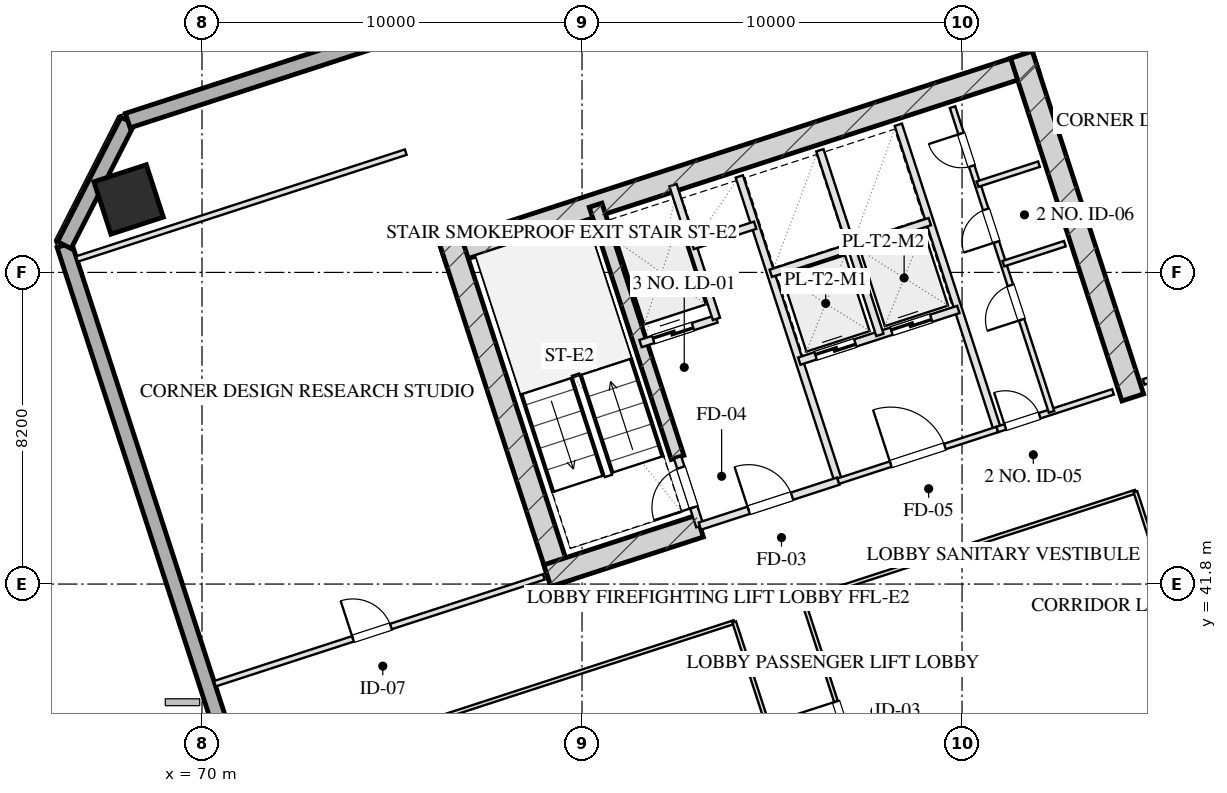
"""IFC4 building model, lengths in metres.
Left out: names, types, materials, properties, quantities, classifications, styles, units other than length and angle.
Written with IfcOpenShell. Run it as: python <this file> out.ifc"""

import sys

from ifc_helpers import new_model, si_unit, direction, frame, frame_2d, origin, origin_2d, place, context, subcontext, project, spatial, rectangle, hollow_rectangle, extrude, element, fill, save


model = new_model("IFC4")
c1 = context("Model", 3, precision=1e-05, world=origin(), true_north=direction((0.0, 1.0)))
c2 = subcontext(c1, "Body", "Model", "MODEL_VIEW")
j1 = project(units=[si_unit("LENGTHUNIT", "METRE"), si_unit("PLANEANGLEUNIT", "RADIAN")], contexts=[c1])
p1 = place(None, origin())
s1 = spatial("IfcSite", under=j1, at=p1, CompositionType="ELEMENT")
p2 = place(p1, origin())
s2 = spatial("IfcBuilding", under=s1, at=p2, CompositionType="ELEMENT")
p3 = place(p2, frame((0.0, 0.0, 131.1)))
s3 = spatial("IfcBuildingStorey", under=s2, at=p3, CompositionType="ELEMENT", Elevation=131.1)
p4 = place(p3, frame((76.344, 50.466, 0.0), z_axis=(0.0, 0.0, 1.0), x_axis=(0.951055727519, 0.309019421968, 0.0)))
e1 = element("IfcWall", 1, at=p4, inside=s3, PredefinedType="SHEAR", context=c2, shape_type="SweptSolid", body=[
    extrude(rectangle(XDim=16.4, YDim=0.6, at=frame_2d((8.2, 0.0))), origin(), (0.0, 0.0, 1.0), 3.45),
])
for number, where, z_axis, x_axis in (
    (2, (79.466, 41.828, 0.0), (0.0, 0.0, 1.0), (-0.309, 0.951, 0.0)),
    (3, (94.492, 46.71, 0.0), (0.0, 0.0, 1.0), (-0.309, 0.951, 0.0)),
):
    element("IfcWall", number, at=place(p3, frame(where, z_axis=z_axis, x_axis=x_axis)), inside=s3, PredefinedType="SHEAR", context=c2, shape_type="SweptSolid", body=[
        extrude(rectangle(XDim=9.48, YDim=0.6, at=frame_2d((4.74, 0.0))), origin(), (0.0, 0.0, 1.0), 3.45),
    ])
p5 = place(p3, frame((82.514, 45.131, 0.0), z_axis=(0.0, 0.0, 1.0), x_axis=(-0.308988790936, 0.951065679686, 0.0)))
e4 = element("IfcWall", 4, at=p5, inside=s3, PredefinedType="SHEAR", context=c2, shape_type="SweptSolid", body=[
    extrude(rectangle(XDim=6.98, YDim=0.35, at=frame_2d((3.49, 0.0))), origin(), (0.0, 0.0, 1.0), 3.45),
])
p6 = place(p3, frame((79.087, 42.021, 0.0), z_axis=(0.0, 0.0, 1.0), x_axis=(0.951062550203, 0.3089984233, 0.0)))
e5 = element("IfcWall", 5, at=p6, inside=s3, PredefinedType="SHEAR", context=c2, shape_type="SweptSolid", body=[
    extrude(rectangle(XDim=4.22, YDim=0.6, at=frame_2d((2.11, 0.0))), origin(), (0.0, 0.0, 1.0), 3.45),
])
p7 = place(p3, frame((68.069, 51.92, 0.0), z_axis=(0.0, 0.0, 1.0), x_axis=(0.951056516295, 0.309016994375, 0.0)))
e6 = element("IfcColumn", 6, at=p7, inside=s3, PredefinedType="COLUMN", context=c2, shape_type="SweptSolid", body=[
    extrude(hollow_rectangle(XDim=1.45, YDim=1.45, WallThickness=0.05, at=origin_2d()), origin(), (0.0, 0.0, 1.0), 3.451),
])
p8 = place(p3, frame((80.716, 6.59, 0.0), z_axis=(0.0, 0.0, 1.0), x_axis=(-0.309017542002, 0.95105633836, 0.0)))
e7 = element("IfcWall", 7, at=p8, inside=s3, PredefinedType="SOLIDWALL", context=c2, shape_type="SweptSolid", body=[
    extrude(rectangle(XDim=46.4, YDim=0.4, at=frame_2d((23.2, 0.0))), origin(), (0.0, 0.0, 1.0), 2.61),
])
p9 = place(p8, frame((24.675, 0.0, 0.75)))
e8 = element("IfcOpeningElement", 8, at=p9, cuts=e7, PredefinedType="OPENING", context=c2, shape_type="SweptSolid", body=[
    extrude(rectangle(XDim=2.25, YDim=1.46, at=frame_2d((1.125, 0.73))), frame((0.0, 0.21, 0.0), z_axis=(0.0, -1.0, 0.0), x_axis=(1.0, 0.0, 0.0)), (0.0, 0.0, 1.0), 0.42),
])
p10 = place(p8, frame((28.475, 0.0, 0.75)))
e9 = element("IfcOpeningElement", 9, at=p10, cuts=e7, PredefinedType="OPENING", context=c2, shape_type="SweptSolid", body=[
    extrude(rectangle(XDim=2.25, YDim=1.46, at=frame_2d((1.125, 0.73))), frame((0.0, 0.21, 0.0), z_axis=(0.0, -1.0, 0.0), x_axis=(1.0, 0.0, 0.0)), (0.0, 0.0, 1.0), 0.42),
])
p11 = place(p8, frame((18.25, 0.0, 0.0)))
e10 = element("IfcOpeningElement", 10, at=p11, cuts=e7, PredefinedType="OPENING", context=c2, shape_type="SweptSolid", body=[
    extrude(rectangle(XDim=1.1, YDim=2.15, at=frame_2d((0.55, 1.075))), frame((0.0, 0.21, 0.0), z_axis=(0.0, -1.0, 0.0), x_axis=(1.0, 0.0, 0.0)), (0.0, 0.0, 1.0), 0.42),
])
p12 = place(p3, frame((66.377, 50.719, 0.0), z_axis=(0.0, 0.0, 1.0), x_axis=(0.454026238093, 0.890988313685, 0.0)))
e11 = element("IfcWall", 11, at=p12, inside=s3, PredefinedType="SOLIDWALL", context=c2, shape_type="SweptSolid", body=[
    extrude(rectangle(XDim=3.677, YDim=0.4, at=frame_2d((1.838, 0.0))), origin(), (0.0, 0.0, 1.0), 2.61),
])
p13 = place(p3, frame((68.047, 53.995, 0.0), z_axis=(0.0, 0.0, 1.0), x_axis=(0.95105505922, 0.309021478754, 0.0)))
e12 = element("IfcWall", 12, at=p13, inside=s3, PredefinedType="SOLIDWALL", context=c2, shape_type="SweptSolid", body=[
    extrude(rectangle(XDim=29.4, YDim=0.4, at=frame_2d((14.7, 0.0))), origin(), (0.0, 0.0, 1.0), 2.61),
])
p14 = place(p3, frame((83.101, 43.324, 0.0), z_axis=(0.0, 0.0, 1.0), x_axis=(-0.309048298632, 0.951046344356, 0.0)))
e13 = element("IfcWall", 13, at=p14, inside=s3, PredefinedType="PARTITIONING", context=c2, shape_type="SweptSolid", body=[
    extrude(rectangle(XDim=1.9, YDim=0.2, at=frame_2d((0.95, 0.0))), origin(), (0.0, 0.0, 1.0), 3.175),
])
p15 = place(p14, frame((0.52, 0.0, 0.0)))
e14 = element("IfcOpeningElement", 14, at=p15, cuts=e13, PredefinedType="OPENING", context=c2, shape_type="SweptSolid", body=[
    extrude(rectangle(XDim=1.1, YDim=2.05, at=frame_2d((0.55, 1.025))), frame((0.0, 0.11, 0.0), z_axis=(0.0, -1.0, 0.0), x_axis=(1.0, 0.0, 0.0)), (0.0, 0.0, 1.0), 0.22),
])
p16 = place(p3, frame((86.743, 44.508, 0.0), z_axis=(0.0, 0.0, 1.0), x_axis=(-0.309016001439, 0.951056838919, 0.0)))
e15 = element("IfcWall", 15, at=p16, inside=s3, PredefinedType="PARTITIONING", context=c2, shape_type="SweptSolid", body=[
    extrude(rectangle(XDim=8.43, YDim=0.2, at=frame_2d((4.215, 0.0))), origin(), (0.0, 0.0, 1.0), 3.175),
])
p17 = place(p3, frame((83.101, 43.324, 0.0), z_axis=(0.0, 0.0, 1.0), x_axis=(0.951052804469, 0.309028417967, 0.0)))
e16 = element("IfcWall", 16, at=p17, inside=s3, PredefinedType="PARTITIONING", context=c2, shape_type="SweptSolid", body=[
    extrude(rectangle(XDim=3.83, YDim=0.2, at=frame_2d((1.915, 0.0))), origin(), (0.0, 0.0, 1.0), 3.175),
])
p18 = place(p17, frame((1.35, 0.0, 0.0)))
e17 = element("IfcOpeningElement", 17, at=p18, cuts=e16, PredefinedType="OPENING", context=c2, shape_type="SweptSolid", body=[
    extrude(rectangle(XDim=1.2, YDim=2.05, at=frame_2d((0.6, 1.025))), frame((0.0, 0.11, 0.0), z_axis=(0.0, -1.0, 0.0), x_axis=(1.0, 0.0, 0.0)), (0.0, 0.0, 1.0), 0.22),
])
p19 = place(p3, frame((81.54, 48.127, 0.0), z_axis=(0.0, 0.0, 1.0), x_axis=(0.951062257173, 0.308999325213, 0.0)))
e18 = element("IfcWall", 18, at=p19, inside=s3, PredefinedType="PARTITIONING", context=c2, shape_type="SweptSolid", body=[
    extrude(rectangle(XDim=2.1, YDim=0.2, at=frame_2d((1.05, 0.0))), origin(), (0.0, 0.0, 1.0), 3.175),
])
p20 = place(p19, frame((0.35, 0.0, 0.0)))
e19 = element("IfcOpeningElement", 19, at=p20, cuts=e18, PredefinedType="OPENING", context=c2, shape_type="SweptSolid", body=[
    extrude(rectangle(XDim=1.1, YDim=2.05, at=frame_2d((0.55, 1.025))), frame((0.0, 0.11, 0.0), z_axis=(0.0, -1.0, 0.0), x_axis=(1.0, 0.0, 0.0)), (0.0, 0.0, 1.0), 0.22),
])
p21 = place(p3, frame((83.538, 48.776, 0.0), z_axis=(0.0, 0.0, 1.0), x_axis=(-0.3089935693, 0.951064127245, 0.0)))
e20 = element("IfcWall", 20, at=p21, inside=s3, PredefinedType="PARTITIONING", context=c2, shape_type="SweptSolid", body=[
    extrude(rectangle(XDim=3.7, YDim=0.2, at=frame_2d((1.85, 0.0))), origin(), (0.0, 0.0, 1.0), 3.175),
])
p22 = place(p3, frame((82.91, 50.707, 0.0), z_axis=(0.0, 0.0, 1.0), x_axis=(0.951041328149, 0.309063734775, 0.0)))
e21 = element("IfcWall", 21, at=p22, inside=s3, PredefinedType="PARTITIONING", context=c2, shape_type="SweptSolid", body=[
    extrude(rectangle(XDim=1.73, YDim=0.2, at=frame_2d((0.865, 0.0))), origin(), (0.0, 0.0, 1.0), 3.175),
])
p23 = place(p3, frame((90.928, 45.868, 0.0), z_axis=(0.0, 0.0, 1.0), x_axis=(-0.309042196757, 0.951048327176, 0.0)))
e22 = element("IfcWall", 22, at=p23, inside=s3, PredefinedType="PARTITIONING", context=c2, shape_type="SweptSolid", body=[
    extrude(rectangle(XDim=8.43, YDim=0.2, at=frame_2d((4.215, 0.0))), origin(), (0.0, 0.0, 1.0), 3.175),
])
p24 = place(p3, frame((86.743, 44.508, 0.0), z_axis=(0.0, 0.0, 1.0), x_axis=(0.951063829732, 0.308994485023, 0.0)))
e23 = element("IfcWall", 23, at=p24, inside=s3, PredefinedType="PARTITIONING", context=c2, shape_type="SweptSolid", body=[
    extrude(rectangle(XDim=4.4, YDim=0.15, at=frame_2d((2.2, 0.0))), origin(), (0.0, 0.0, 1.0), 3.175),
])
p25 = place(p24, frame((1.45, 0.0, 0.0)))
e24 = element("IfcOpeningElement", 24, at=p25, cuts=e23, PredefinedType="OPENING", context=c2, shape_type="SweptSolid", body=[
    extrude(rectangle(XDim=1.5, YDim=2.05, at=frame_2d((0.75, 1.025))), frame((0.0, 0.085, 0.0), z_axis=(0.0, -1.0, 0.0), x_axis=(1.0, 0.0, 0.0)), (0.0, 0.0, 1.0), 0.17),
])
p26 = place(p3, frame((85.718, 47.666, 0.0), z_axis=(0.0, 0.0, 1.0), x_axis=(0.951058531764, 0.30901079133, 0.0)))
e25 = element("IfcWall", 25, at=p26, inside=s3, PredefinedType="PARTITIONING", context=c2, shape_type="SweptSolid", body=[
    extrude(rectangle(XDim=4.4, YDim=0.2, at=frame_2d((2.2, 0.0))), origin(), (0.0, 0.0, 1.0), 3.175),
])
p27 = place(p26, frame((0.45, 0.0, 0.0)))
e26 = element("IfcOpeningElement", 26, at=p27, cuts=e25, PredefinedType="OPENING", context=c2, shape_type="SweptSolid", body=[
    extrude(rectangle(XDim=1.1, YDim=2.05, at=frame_2d((0.55, 1.025))), frame((0.0, 0.11, 0.0), z_axis=(0.0, -1.0, 0.0), x_axis=(1.0, 0.0, 0.0)), (0.0, 0.0, 1.0), 0.22),
])
p28 = place(p26, frame((2.55, 0.0, 0.0)))
e27 = element("IfcOpeningElement", 27, at=p28, cuts=e25, PredefinedType="OPENING", context=c2, shape_type="SweptSolid", body=[
    extrude(rectangle(XDim=1.1, YDim=2.05, at=frame_2d((0.55, 1.025))), frame((0.0, 0.11, 0.0), z_axis=(0.0, -1.0, 0.0), x_axis=(1.0, 0.0, 0.0)), (0.0, 0.0, 1.0), 0.22),
])
p29 = place(p3, frame((87.838, 48.354, 0.0), z_axis=(0.0, 0.0, 1.0), x_axis=(-0.3090093719, 0.951058992953, 0.0)))
e28 = element("IfcWall", 28, at=p29, inside=s3, PredefinedType="PARTITIONING", context=c2, shape_type="SweptSolid", body=[
    extrude(rectangle(XDim=5.11, YDim=0.2, at=frame_2d((2.555, 0.0))), origin(), (0.0, 0.0, 1.0), 3.175),
])
p30 = place(p3, frame((84.967, 49.977, 0.0), z_axis=(0.0, 0.0, 1.0), x_axis=(0.951063829732, 0.308994485023, 0.0)))
e29 = element("IfcWall", 29, at=p30, inside=s3, PredefinedType="PARTITIONING", context=c2, shape_type="SweptSolid", body=[
    extrude(rectangle(XDim=4.4, YDim=0.2, at=frame_2d((2.2, 0.0))), origin(), (0.0, 0.0, 1.0), 3.175),
])
p31 = place(p3, frame((90.928, 45.868, 0.0), z_axis=(0.0, 0.0, 1.0), x_axis=(0.951059297078, 0.309008435874, 0.0)))
e30 = element("IfcWall", 30, at=p31, inside=s3, PredefinedType="PARTITIONING", context=c2, shape_type="SweptSolid", body=[
    extrude(rectangle(XDim=3.2, YDim=0.15, at=frame_2d((1.6, 0.0))), origin(), (0.0, 0.0, 1.0), 3.175),
])
p32 = place(p31, frame((0.22, 0.0, 0.0)))
e31 = element("IfcOpeningElement", 31, at=p32, cuts=e30, PredefinedType="OPENING", context=c2, shape_type="SweptSolid", body=[
    extrude(rectangle(XDim=0.95, YDim=2.05, at=frame_2d((0.475, 1.025))), frame((0.0, 0.085, 0.0), z_axis=(0.0, -1.0, 0.0), x_axis=(1.0, 0.0, 0.0)), (0.0, 0.0, 1.0), 0.17),
])
p33 = place(p3, frame((92.355, 46.331, 0.0), z_axis=(0.0, 0.0, 1.0), x_axis=(-0.309007490203, 0.951059604335, 0.0)))
e32 = element("IfcWall", 32, at=p33, inside=s3, PredefinedType="PARTITIONING", context=c2, shape_type="SweptSolid", body=[
    extrude(rectangle(XDim=8.43, YDim=0.15, at=frame_2d((4.215, 0.0))), origin(), (0.0, 0.0, 1.0), 3.175),
])
p34 = place(p33, frame((2.55, 0.0, 0.0)))
e33 = element("IfcOpeningElement", 33, at=p34, cuts=e32, PredefinedType="OPENING", context=c2, shape_type="SweptSolid", body=[
    extrude(rectangle(XDim=0.95, YDim=2.05, at=frame_2d((0.475, 1.025))), frame((0.0, 0.085, 0.0), z_axis=(0.0, -1.0, 0.0), x_axis=(1.0, 0.0, 0.0)), (0.0, 0.0, 1.0), 0.17),
])
p35 = place(p33, frame((4.7, 0.0, 0.0)))
e34 = element("IfcOpeningElement", 34, at=p35, cuts=e32, PredefinedType="OPENING", context=c2, shape_type="SweptSolid", body=[
    extrude(rectangle(XDim=0.9, YDim=2.05, at=frame_2d((0.45, 1.025))), frame((0.0, 0.085, 0.0), z_axis=(0.0, -1.0, 0.0), x_axis=(1.0, 0.0, 0.0)), (0.0, 0.0, 1.0), 0.17),
])
p36 = place(p33, frame((6.8, 0.0, 0.0)))
e35 = element("IfcOpeningElement", 35, at=p36, cuts=e32, PredefinedType="OPENING", context=c2, shape_type="SweptSolid", body=[
    extrude(rectangle(XDim=0.9, YDim=2.05, at=frame_2d((0.45, 1.025))), frame((0.0, 0.085, 0.0), z_axis=(0.0, -1.0, 0.0), x_axis=(1.0, 0.0, 0.0)), (0.0, 0.0, 1.0), 0.17),
])
p37 = place(p3, frame((91.088, 50.23, 0.0), z_axis=(0.0, 0.0, 1.0), x_axis=(0.951054116971, 0.309024378638, 0.0)))
e36 = element("IfcWall", 36, at=p37, inside=s3, PredefinedType="PARTITIONING", context=c2, shape_type="SweptSolid", body=[
    extrude(rectangle(XDim=1.7, YDim=0.15, at=frame_2d((0.85, 0.0))), origin(), (0.0, 0.0, 1.0), 3.175),
])
p38 = place(p3, frame((90.408, 52.323, 0.0), z_axis=(0.0, 0.0, 1.0), x_axis=(0.951040401051, 0.309066587596, 0.0)))
e37 = element("IfcWall", 37, at=p38, inside=s3, PredefinedType="PARTITIONING", context=c2, shape_type="SweptSolid", body=[
    extrude(rectangle(XDim=1.7, YDim=0.15, at=frame_2d((0.85, 0.0))), origin(), (0.0, 0.0, 1.0), 3.175),
])
p39 = place(p3, frame((66.707, 50.352, 0.0), z_axis=(0.0, 0.0, 1.0), x_axis=(0.951057133767, 0.309015093986, 0.0)))
e38 = element("IfcWall", 38, at=p39, inside=s3, PredefinedType="PARTITIONING", context=c2, shape_type="SweptSolid", body=[
    extrude(rectangle(XDim=9.1, YDim=0.15, at=frame_2d((4.55, 0.0))), origin(), (0.0, 0.0, 1.0), 3.175),
])
p40 = place(p3, frame((70.338, 39.177, 0.0), z_axis=(0.0, 0.0, 1.0), x_axis=(0.951059695568, 0.309007209409, 0.0)))
e39 = element("IfcWall", 39, at=p40, inside=s3, PredefinedType="PARTITIONING", context=c2, shape_type="SweptSolid", body=[
    extrude(rectangle(XDim=9.1, YDim=0.15, at=frame_2d((4.55, 0.0))), origin(), (0.0, 0.0, 1.0), 2.15),
])
p41 = place(p40, frame((3.822, 0.0, 0.0)))
e40 = element("IfcOpeningElement", 40, at=p41, cuts=e39, PredefinedType="OPENING", context=c2, shape_type="SweptSolid", body=[
    extrude(rectangle(XDim=1.05, YDim=2.05, at=frame_2d((0.525, 1.025))), frame((0.0, 0.085, 0.0), z_axis=(0.0, -1.0, 0.0), x_axis=(1.0, 0.0, 0.0)), (0.0, 0.0, 1.0), 0.17),
])
p42 = place(p3, frame((94.78, 47.119, 0.0), z_axis=(0.0, 0.0, 1.0), x_axis=(0.951054329824, 0.309023723562, 0.0)))
e41 = element("IfcWall", 41, at=p42, inside=s3, PredefinedType="PARTITIONING", context=c2, shape_type="SweptSolid", body=[
    extrude(rectangle(XDim=8.5, YDim=0.15, at=frame_2d((4.25, 0.0))), origin(), (0.0, 0.0, 1.0), 2.15),
])
p43 = place(p42, frame((3.57, 0.0, 0.0)))
e42 = element("IfcOpeningElement", 42, at=p43, cuts=e41, PredefinedType="OPENING", context=c2, shape_type="SweptSolid", body=[
    extrude(rectangle(XDim=1.0, YDim=2.05, at=frame_2d((0.5, 1.025))), frame((0.0, 0.085, 0.0), z_axis=(0.0, -1.0, 0.0), x_axis=(1.0, 0.0, 0.0)), (0.0, 0.0, 1.0), 0.17),
])
p44 = place(p3, frame((71.166, 36.629, 0.0), z_axis=(0.0, 0.0, 1.0), x_axis=(0.951057589409, 0.309013691651, 0.0)))
e43 = element("IfcWall", 43, at=p44, inside=s3, PredefinedType="MOVABLE", context=c2, shape_type="SweptSolid", body=[
    extrude(rectangle(XDim=13.5, YDim=0.1, at=frame_2d((6.75, 0.0))), origin(), (0.0, 0.0, 1.0), 3.175),
])
p45 = place(p3, frame((85.812, 41.387, 0.0), z_axis=(0.0, 0.0, 1.0), x_axis=(0.951054933035, 0.309021867106, 0.0)))
e44 = element("IfcWall", 44, at=p45, inside=s3, PredefinedType="MOVABLE", context=c2, shape_type="SweptSolid", body=[
    extrude(rectangle(XDim=9.2, YDim=0.1, at=frame_2d((4.6, 0.0))), origin(), (0.0, 0.0, 1.0), 3.175),
])
p46 = place(p3, frame((89.147, 24.975, 0.0), z_axis=(0.0, 0.0, 1.0), x_axis=(-0.309022042254, 0.951054876125, 0.0)))
e45 = element("IfcWall", 45, at=p46, inside=s3, PredefinedType="MOVABLE", context=c2, shape_type="SweptSolid", body=[
    extrude(rectangle(XDim=16.64, YDim=0.1, at=frame_2d((8.32, 0.0))), origin(), (0.0, 0.0, 1.0), 3.175),
])
p47 = place(p46, frame((3.32, 0.0, 0.0)))
e46 = element("IfcOpeningElement", 46, at=p47, cuts=e45, PredefinedType="OPENING", context=c2, shape_type="SweptSolid", body=[
    extrude(rectangle(XDim=1.0, YDim=2.05, at=frame_2d((0.5, 1.025))), frame((0.0, 0.06, 0.0), z_axis=(0.0, -1.0, 0.0), x_axis=(1.0, 0.0, 0.0)), (0.0, 0.0, 1.0), 0.12),
])
p48 = place(p46, frame((11.64, 0.0, 0.0)))
e47 = element("IfcOpeningElement", 47, at=p48, cuts=e45, PredefinedType="OPENING", context=c2, shape_type="SweptSolid", body=[
    extrude(rectangle(XDim=1.0, YDim=2.05, at=frame_2d((0.5, 1.025))), frame((0.0, 0.06, 0.0), z_axis=(0.0, -1.0, 0.0), x_axis=(1.0, 0.0, 0.0)), (0.0, 0.0, 1.0), 0.12),
])
p49 = place(p3, frame((90.954, 25.562, 0.0), z_axis=(0.0, 0.0, 1.0), x_axis=(-0.30901773025, 0.951056277195, 0.0)))
e48 = element("IfcWall", 48, at=p49, inside=s3, PredefinedType="MOVABLE", context=c2, shape_type="SweptSolid", body=[
    extrude(rectangle(XDim=16.64, YDim=0.1, at=frame_2d((8.32, 0.0))), origin(), (0.0, 0.0, 1.0), 3.175),
])
p50 = place(p49, frame((4.284, 0.0, 0.0)))
e49 = element("IfcOpeningElement", 49, at=p50, cuts=e48, PredefinedType="OPENING", context=c2, shape_type="SweptSolid", body=[
    extrude(rectangle(XDim=1.1, YDim=2.05, at=frame_2d((0.55, 1.025))), frame((0.0, 0.06, 0.0), z_axis=(0.0, -1.0, 0.0), x_axis=(1.0, 0.0, 0.0)), (0.0, 0.0, 1.0), 0.12),
])
p51 = place(p49, frame((12.724, 0.0, 0.0)))
e50 = element("IfcOpeningElement", 50, at=p51, cuts=e48, PredefinedType="OPENING", context=c2, shape_type="SweptSolid", body=[
    extrude(rectangle(XDim=1.1, YDim=2.05, at=frame_2d((0.55, 1.025))), frame((0.0, 0.06, 0.0), z_axis=(0.0, -1.0, 0.0), x_axis=(1.0, 0.0, 0.0)), (0.0, 0.0, 1.0), 0.12),
])
p52 = place(p3, frame((99.704, 28.405, 0.0), z_axis=(0.0, 0.0, 1.0), x_axis=(-0.309004459387, 0.951060589068, 0.0)))
e51 = element("IfcWall", 51, at=p52, inside=s3, PredefinedType="MOVABLE", context=c2, shape_type="SweptSolid", body=[
    extrude(rectangle(XDim=16.64, YDim=0.1, at=frame_2d((8.32, 0.0))), origin(), (0.0, 0.0, 1.0), 3.175),
])
p53 = place(p15, origin())
e52 = element("IfcDoor", 52, at=p53, inside=s3, OperationType="SINGLE_SWING_LEFT", PredefinedType="DOOR", context=c2, shape_type="SweptSolid", body=[
    extrude(rectangle(XDim=1.1, YDim=2.05, at=frame_2d((0.55, 1.025))), frame((0.0, 0.025, 0.0), z_axis=(0.0, -1.0, 0.0), x_axis=(1.0, 0.0, 0.0)), (0.0, 0.0, 1.0), 0.05),
])
fill(e14, e52)
p54 = place(p18, origin())
e53 = element("IfcDoor", 53, at=p54, inside=s3, OperationType="SINGLE_SWING_LEFT", PredefinedType="DOOR", context=c2, shape_type="SweptSolid", body=[
    extrude(rectangle(XDim=1.2, YDim=2.05, at=frame_2d((0.6, 1.025))), frame((0.0, 0.025, 0.0), z_axis=(0.0, -1.0, 0.0), x_axis=(1.0, 0.0, 0.0)), (0.0, 0.0, 1.0), 0.05),
])
fill(e17, e53)
p55 = place(p20, origin())
e54 = element("IfcDoor", 54, at=p55, inside=s3, OperationType="DOUBLE_DOOR_SLIDING", PredefinedType="DOOR", context=c2, shape_type="SweptSolid", body=[
    extrude(rectangle(XDim=1.1, YDim=2.05, at=frame_2d((0.55, 1.025))), frame((0.0, 0.025, 0.0), z_axis=(0.0, -1.0, 0.0), x_axis=(1.0, 0.0, 0.0)), (0.0, 0.0, 1.0), 0.05),
])
fill(e19, e54)
p56 = place(p25, origin())
e55 = element("IfcDoor", 55, at=p56, inside=s3, OperationType="SINGLE_SWING_LEFT", PredefinedType="DOOR", context=c2, shape_type="SweptSolid", body=[
    extrude(rectangle(XDim=1.5, YDim=2.05, at=frame_2d((0.75, 1.025))), frame((0.0, 0.025, 0.0), z_axis=(0.0, -1.0, 0.0), x_axis=(1.0, 0.0, 0.0)), (0.0, 0.0, 1.0), 0.05),
])
fill(e24, e55)
p57 = place(p27, origin())
e56 = element("IfcDoor", 56, at=p57, inside=s3, OperationType="DOUBLE_DOOR_SLIDING", PredefinedType="DOOR", context=c2, shape_type="SweptSolid", body=[
    extrude(rectangle(XDim=1.1, YDim=2.05, at=frame_2d((0.55, 1.025))), frame((0.0, 0.025, 0.0), z_axis=(0.0, -1.0, 0.0), x_axis=(1.0, 0.0, 0.0)), (0.0, 0.0, 1.0), 0.05),
])
fill(e26, e56)
p58 = place(p28, origin())
e57 = element("IfcDoor", 57, at=p58, inside=s3, OperationType="DOUBLE_DOOR_SLIDING", PredefinedType="DOOR", context=c2, shape_type="SweptSolid", body=[
    extrude(rectangle(XDim=1.1, YDim=2.05, at=frame_2d((0.55, 1.025))), frame((0.0, 0.025, 0.0), z_axis=(0.0, -1.0, 0.0), x_axis=(1.0, 0.0, 0.0)), (0.0, 0.0, 1.0), 0.05),
])
fill(e27, e57)
p59 = place(p32, origin())
e58 = element("IfcDoor", 58, at=p59, inside=s3, OperationType="SINGLE_SWING_LEFT", PredefinedType="DOOR", context=c2, shape_type="SweptSolid", body=[
    extrude(rectangle(XDim=0.95, YDim=2.05, at=frame_2d((0.475, 1.025))), frame((0.0, 0.025, 0.0), z_axis=(0.0, -1.0, 0.0), x_axis=(1.0, 0.0, 0.0)), (0.0, 0.0, 1.0), 0.05),
])
fill(e31, e58)
p60 = place(p34, origin())
e59 = element("IfcDoor", 59, at=p60, inside=s3, OperationType="SINGLE_SWING_LEFT", PredefinedType="DOOR", context=c2, shape_type="SweptSolid", body=[
    extrude(rectangle(XDim=0.95, YDim=2.05, at=frame_2d((0.475, 1.025))), frame((0.0, 0.025, 0.0), z_axis=(0.0, -1.0, 0.0), x_axis=(1.0, 0.0, 0.0)), (0.0, 0.0, 1.0), 0.05),
])
fill(e33, e59)
p61 = place(p35, origin())
e60 = element("IfcDoor", 60, at=p61, inside=s3, OperationType="SINGLE_SWING_LEFT", PredefinedType="DOOR", context=c2, shape_type="SweptSolid", body=[
    extrude(rectangle(XDim=0.9, YDim=2.05, at=frame_2d((0.45, 1.025))), frame((0.0, 0.025, 0.0), z_axis=(0.0, -1.0, 0.0), x_axis=(1.0, 0.0, 0.0)), (0.0, 0.0, 1.0), 0.05),
])
fill(e34, e60)
p62 = place(p36, origin())
e61 = element("IfcDoor", 61, at=p62, inside=s3, OperationType="SINGLE_SWING_RIGHT", PredefinedType="DOOR", context=c2, shape_type="SweptSolid", body=[
    extrude(rectangle(XDim=0.9, YDim=2.05, at=frame_2d((0.45, 1.025))), frame((0.0, 0.025, 0.0), z_axis=(0.0, -1.0, 0.0), x_axis=(1.0, 0.0, 0.0)), (0.0, 0.0, 1.0), 0.05),
])
fill(e35, e61)
p63 = place(p41, origin())
e62 = element("IfcDoor", 62, at=p63, inside=s3, OperationType="SINGLE_SWING_LEFT", PredefinedType="DOOR", context=c2, shape_type="SweptSolid", body=[
    extrude(rectangle(XDim=1.05, YDim=2.05, at=frame_2d((0.525, 1.025))), frame((0.0, 0.025, 0.0), z_axis=(0.0, -1.0, 0.0), x_axis=(1.0, 0.0, 0.0)), (0.0, 0.0, 1.0), 0.05),
])
fill(e40, e62)
p64 = place(p51, origin())
e63 = element("IfcDoor", 63, at=p64, inside=s3, OperationType="SINGLE_SWING_RIGHT", PredefinedType="DOOR", context=c2, shape_type="SweptSolid", body=[
    extrude(rectangle(XDim=1.1, YDim=2.05, at=frame_2d((0.55, 1.025))), frame((0.0, 0.025, 0.0), z_axis=(0.0, -1.0, 0.0), x_axis=(1.0, 0.0, 0.0)), (0.0, 0.0, 1.0), 0.05),
])
fill(e50, e63)
save(model, sys.argv[1])
